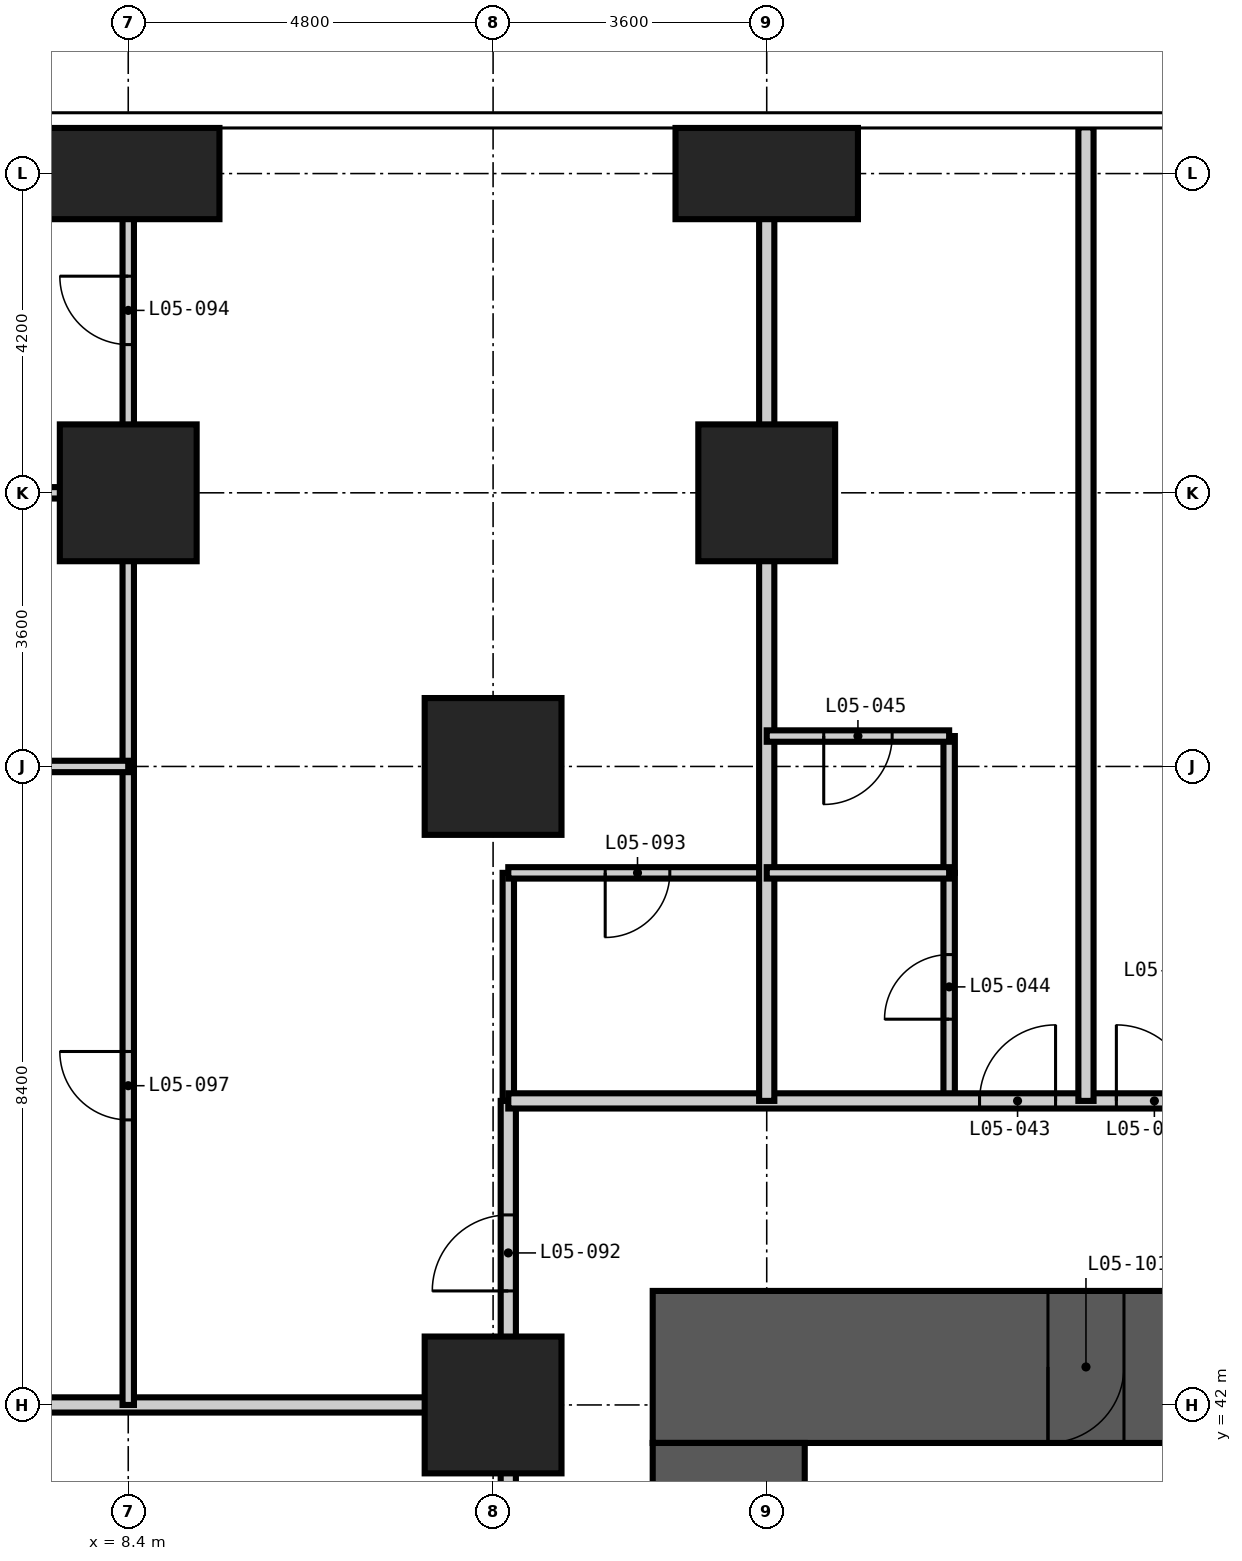
"""IFC4 building model, lengths in metres.
Left out: names, types, materials, properties, quantities, classifications, styles, units other than length and angle.
Written with IfcOpenShell. Run it as: python <this file> out.ifc"""

import sys

from ifc_helpers import new_model, si_unit, direction, frame, frame_2d, origin, origin_2d, place, context, subcontext, project, spatial, rectangle, extrude, element, fill, save


model = new_model("IFC4")
c1 = context("Model", 3, precision=1e-05, world=origin(), true_north=direction((0.0, 1.0)))
c2 = subcontext(c1, "Body", "Model", "MODEL_VIEW")
j1 = project(units=[si_unit("LENGTHUNIT", "METRE"), si_unit("PLANEANGLEUNIT", "RADIAN")], contexts=[c1])
p1 = place(None, origin())
s1 = spatial("IfcSite", under=j1, at=p1, CompositionType="ELEMENT")
p2 = place(p1, origin())
s2 = spatial("IfcBuilding", under=s1, at=p2, CompositionType="ELEMENT")
p3 = place(p2, frame((0.0, 0.0, 27.0)))
s3 = spatial("IfcBuildingStorey", under=s2, at=p3, CompositionType="ELEMENT", Elevation=27.0)
p4 = place(p3, frame((8.4, 54.0, -0.35), z_axis=(0.0, 0.0, 1.0), x_axis=(1.0, 0.0, 0.0)))
e1 = element("IfcColumn", 1, at=p4, inside=s3, PredefinedType="COLUMN", context=c2, shape_type="SweptSolid", body=[
    extrude(rectangle(XDim=1.8, YDim=1.8, at=origin_2d()), origin(), (0.0, 0.0, 1.0), 3.6),
])
p5 = place(p3, frame((8.4, 58.2, -0.35), z_axis=(0.0, 0.0, 1.0), x_axis=(1.0, 0.0, 0.0)))
e2 = element("IfcColumn", 2, at=p5, inside=s3, PredefinedType="COLUMN", context=c2, shape_type="SweptSolid", body=[
    extrude(rectangle(XDim=2.4, YDim=1.2, at=origin_2d()), origin(), (0.0, 0.0, 1.0), 3.6),
])
for number, where, z_axis, x_axis in (
    (3, (13.2, 42.0, -0.35), (0.0, 0.0, 1.0), (1.0, 0.0, 0.0)),
    (4, (13.2, 50.4, -0.35), (0.0, 0.0, 1.0), (1.0, 0.0, 0.0)),
    (5, (16.8, 54.0, -0.35), (0.0, 0.0, 1.0), (1.0, 0.0, 0.0)),
):
    element("IfcColumn", number, at=place(p3, frame(where, z_axis=z_axis, x_axis=x_axis)), inside=s3, PredefinedType="COLUMN", context=c2, shape_type="SweptSolid", body=[
        extrude(rectangle(XDim=1.8, YDim=1.8, at=origin_2d()), origin(), (0.0, 0.0, 1.0), 3.6),
    ])
p6 = place(p3, frame((16.8, 58.2, -0.35), z_axis=(0.0, 0.0, 1.0), x_axis=(1.0, 0.0, 0.0)))
e6 = element("IfcColumn", 6, at=p6, inside=s3, PredefinedType="COLUMN", context=c2, shape_type="SweptSolid", body=[
    extrude(rectangle(XDim=2.4, YDim=1.2, at=origin_2d()), origin(), (0.0, 0.0, 1.0), 3.6),
])
p7 = place(p3, frame((43.5, 42.5, -0.35), z_axis=(0.0, 0.0, 1.0), x_axis=(-1.0, 0.0, 0.0)))
e7 = element("IfcWall", 7, at=p7, inside=s3, PredefinedType="SHEAR", context=c2, shape_type="SweptSolid", body=[
    extrude(rectangle(XDim=28.2, YDim=2.0, at=frame_2d((14.1, 0.0))), origin(), (0.0, 0.0, 1.0), 3.6),
])
p8 = place(p7, frame((22.0, 0.0, 0.35)))
e8 = element("IfcOpeningElement", 8, at=p8, cuts=e7, PredefinedType="OPENING", context=c2, shape_type="SweptSolid", body=[
    extrude(rectangle(XDim=1.0, YDim=2.1, at=frame_2d((0.5, 1.05))), frame((0.0, 1.01, 0.0), z_axis=(0.0, -1.0, 0.0), x_axis=(1.0, 0.0, 0.0)), (0.0, 0.0, 1.0), 2.02),
])
p9 = place(p7, frame((11.4, 0.0, 0.35)))
e9 = element("IfcOpeningElement", 9, at=p9, cuts=e7, PredefinedType="OPENING", context=c2, shape_type="SweptSolid", body=[
    extrude(rectangle(XDim=1.2, YDim=2.2, at=frame_2d((0.6, 1.1))), frame((0.0, 1.01, 0.0), z_axis=(0.0, -1.0, 0.0), x_axis=(1.0, 0.0, 0.0)), (0.0, 0.0, 1.0), 2.02),
])
p10 = place(p3, frame((16.3, 41.5, -0.35), z_axis=(0.0, 0.0, 1.0), x_axis=(0.0, -1.0, 0.0)))
e10 = element("IfcWall", 10, at=p10, inside=s3, PredefinedType="SHEAR", context=c2, shape_type="SweptSolid", body=[
    extrude(rectangle(XDim=24.2, YDim=2.0, at=frame_2d((12.1, 0.0))), origin(), (0.0, 0.0, 1.0), 3.6),
])
p11 = place(p10, frame((11.2, 0.0, 0.35)))
e11 = element("IfcOpeningElement", 11, at=p11, cuts=e10, PredefinedType="OPENING", context=c2, shape_type="SweptSolid", body=[
    extrude(rectangle(XDim=1.8, YDim=2.2, at=frame_2d((0.9, 1.1))), frame((0.0, 1.01, 0.0), z_axis=(0.0, -1.0, 0.0), x_axis=(1.0, 0.0, 0.0)), (0.0, 0.0, 1.0), 2.02),
])
p12 = place(p10, frame((20.0, 0.0, 0.35)))
e12 = element("IfcOpeningElement", 12, at=p12, cuts=e10, PredefinedType="OPENING", context=c2, shape_type="SweptSolid", body=[
    extrude(rectangle(XDim=1.0, YDim=2.1, at=frame_2d((0.5, 1.05))), frame((0.0, 1.01, 0.0), z_axis=(0.0, -1.0, 0.0), x_axis=(1.0, 0.0, 0.0)), (0.0, 0.0, 1.0), 2.02),
])
p13 = place(p10, frame((5.3, 0.0, 0.35)))
e13 = element("IfcOpeningElement", 13, at=p13, cuts=e10, PredefinedType="OPENING", context=c2, shape_type="SweptSolid", body=[
    extrude(rectangle(XDim=1.0, YDim=2.1, at=frame_2d((0.5, 1.05))), frame((0.0, 1.01, 0.0), z_axis=(0.0, -1.0, 0.0), x_axis=(1.0, 0.0, 0.0)), (0.0, 0.0, 1.0), 2.02),
])
p14 = place(p3, frame((13.4, 46.0, 0.0), z_axis=(0.0, 0.0, 1.0), x_axis=(0.0, 1.0, 0.0)))
e14 = element("IfcWall", 14, at=p14, inside=s3, PredefinedType="PARTITIONING", context=c2, shape_type="SweptSolid", body=[
    extrude(rectangle(XDim=3.0, YDim=0.15, at=frame_2d((1.5, 0.0))), origin(), (0.0, 0.0, 1.0), 3.25),
])
p15 = place(p3, frame((19.2, 46.0, 0.0), z_axis=(0.0, 0.0, 1.0), x_axis=(0.0, 1.0, 0.0)))
e15 = element("IfcWall", 15, at=p15, inside=s3, PredefinedType="PARTITIONING", context=c2, shape_type="SweptSolid", body=[
    extrude(rectangle(XDim=3.0, YDim=0.15, at=frame_2d((1.5, 0.0))), origin(), (0.0, 0.0, 1.0), 3.25),
])
p16 = place(p15, frame((1.075, 0.0, 0.0)))
e16 = element("IfcOpeningElement", 16, at=p16, cuts=e15, PredefinedType="OPENING", context=c2, shape_type="SweptSolid", body=[
    extrude(rectangle(XDim=0.85, YDim=2.1, at=frame_2d((0.425, 1.05))), frame((0.0, 0.085, 0.0), z_axis=(0.0, -1.0, 0.0), x_axis=(1.0, 0.0, 0.0)), (0.0, 0.0, 1.0), 0.17),
])
p17 = place(p3, frame((13.4, 49.0, 0.0), z_axis=(0.0, 0.0, 1.0), x_axis=(1.0, 0.0, 0.0)))
e17 = element("IfcWall", 17, at=p17, inside=s3, PredefinedType="PARTITIONING", context=c2, shape_type="SweptSolid", body=[
    extrude(rectangle(XDim=3.4, YDim=0.15, at=frame_2d((1.7, 0.0))), origin(), (0.0, 0.0, 1.0), 3.25),
])
p18 = place(p17, frame((1.275, 0.0, 0.0)))
e18 = element("IfcOpeningElement", 18, at=p18, cuts=e17, PredefinedType="OPENING", context=c2, shape_type="SweptSolid", body=[
    extrude(rectangle(XDim=0.85, YDim=2.1, at=frame_2d((0.425, 1.05))), frame((0.0, 0.085, 0.0), z_axis=(0.0, -1.0, 0.0), x_axis=(1.0, 0.0, 0.0)), (0.0, 0.0, 1.0), 0.17),
])
p19 = place(p3, frame((5.4, 54.0, 0.0), z_axis=(0.0, 0.0, 1.0), x_axis=(1.0, 0.0, 0.0)))
e19 = element("IfcWall", 19, at=p19, inside=s3, PredefinedType="PARTITIONING", context=c2, shape_type="SweptSolid", body=[
    extrude(rectangle(XDim=3.0, YDim=0.15, at=frame_2d((1.5, 0.0))), origin(), (0.0, 0.0, 1.0), 3.25),
])
p20 = place(p3, frame((13.4, 42.0, 0.0), z_axis=(0.0, 0.0, 1.0), x_axis=(0.0, 1.0, 0.0)))
e20 = element("IfcWall", 20, at=p20, inside=s3, PredefinedType="PARTITIONING", context=c2, shape_type="SweptSolid", body=[
    extrude(rectangle(XDim=4.0, YDim=0.2, at=frame_2d((2.0, 0.0))), origin(), (0.0, 0.0, 1.0), 3.25),
])
p21 = place(p20, frame((1.5, 0.0, 0.0)))
e21 = element("IfcOpeningElement", 21, at=p21, cuts=e20, PredefinedType="OPENING", context=c2, shape_type="SweptSolid", body=[
    extrude(rectangle(XDim=1.0, YDim=2.2, at=frame_2d((0.5, 1.1))), frame((0.0, 0.11, 0.0), z_axis=(0.0, -1.0, 0.0), x_axis=(1.0, 0.0, 0.0)), (0.0, 0.0, 1.0), 0.22),
])
p22 = place(p3, frame((13.4, 46.0, 0.0), z_axis=(0.0, 0.0, 1.0), x_axis=(1.0, 0.0, 0.0)))
e22 = element("IfcWall", 22, at=p22, inside=s3, PredefinedType="PARTITIONING", context=c2, shape_type="SweptSolid", body=[
    extrude(rectangle(XDim=32.3, YDim=0.2, at=frame_2d((16.15, 0.0))), origin(), (0.0, 0.0, 1.0), 3.25),
])
p23 = place(p22, frame((6.2, 0.0, 0.0)))
e23 = element("IfcOpeningElement", 23, at=p23, cuts=e22, PredefinedType="OPENING", context=c2, shape_type="SweptSolid", body=[
    extrude(rectangle(XDim=1.0, YDim=2.2, at=frame_2d((0.5, 1.1))), frame((0.0, 0.11, 0.0), z_axis=(0.0, -1.0, 0.0), x_axis=(1.0, 0.0, 0.0)), (0.0, 0.0, 1.0), 0.22),
])
p24 = place(p22, frame((8.0, 0.0, 0.0)))
e24 = element("IfcOpeningElement", 24, at=p24, cuts=e22, PredefinedType="OPENING", context=c2, shape_type="SweptSolid", body=[
    extrude(rectangle(XDim=1.0, YDim=2.2, at=frame_2d((0.5, 1.1))), frame((0.0, 0.11, 0.0), z_axis=(0.0, -1.0, 0.0), x_axis=(1.0, 0.0, 0.0)), (0.0, 0.0, 1.0), 0.22),
])
p25 = place(p22, frame((14.6, 0.0, 0.0)))
e25 = element("IfcOpeningElement", 25, at=p25, cuts=e22, PredefinedType="OPENING", context=c2, shape_type="SweptSolid", body=[
    extrude(rectangle(XDim=1.0, YDim=2.2, at=frame_2d((0.5, 1.1))), frame((0.0, 0.11, 0.0), z_axis=(0.0, -1.0, 0.0), x_axis=(1.0, 0.0, 0.0)), (0.0, 0.0, 1.0), 0.22),
])
p26 = place(p22, frame((16.4, 0.0, 0.0)))
e26 = element("IfcOpeningElement", 26, at=p26, cuts=e22, PredefinedType="OPENING", context=c2, shape_type="SweptSolid", body=[
    extrude(rectangle(XDim=1.0, YDim=2.2, at=frame_2d((0.5, 1.1))), frame((0.0, 0.11, 0.0), z_axis=(0.0, -1.0, 0.0), x_axis=(1.0, 0.0, 0.0)), (0.0, 0.0, 1.0), 0.22),
])
p27 = place(p22, frame((23.0, 0.0, 0.0)))
e27 = element("IfcOpeningElement", 27, at=p27, cuts=e22, PredefinedType="OPENING", context=c2, shape_type="SweptSolid", body=[
    extrude(rectangle(XDim=1.0, YDim=2.2, at=frame_2d((0.5, 1.1))), frame((0.0, 0.11, 0.0), z_axis=(0.0, -1.0, 0.0), x_axis=(1.0, 0.0, 0.0)), (0.0, 0.0, 1.0), 0.22),
])
p28 = place(p22, frame((24.8, 0.0, 0.0)))
e28 = element("IfcOpeningElement", 28, at=p28, cuts=e22, PredefinedType="OPENING", context=c2, shape_type="SweptSolid", body=[
    extrude(rectangle(XDim=1.0, YDim=2.2, at=frame_2d((0.5, 1.1))), frame((0.0, 0.11, 0.0), z_axis=(0.0, -1.0, 0.0), x_axis=(1.0, 0.0, 0.0)), (0.0, 0.0, 1.0), 0.22),
])
p29 = place(p3, frame((13.4, 42.0, 0.0), z_axis=(0.0, 0.0, 1.0), x_axis=(0.0, -1.0, 0.0)))
e29 = element("IfcWall", 29, at=p29, inside=s3, PredefinedType="PARTITIONING", context=c2, shape_type="SweptSolid", body=[
    extrude(rectangle(XDim=8.4, YDim=0.2, at=frame_2d((4.2, 0.0))), origin(), (0.0, 0.0, 1.0), 3.25),
])
p30 = place(p29, frame((3.3, 0.0, 0.0)))
e30 = element("IfcOpeningElement", 30, at=p30, cuts=e29, PredefinedType="OPENING", context=c2, shape_type="SweptSolid", body=[
    extrude(rectangle(XDim=1.8, YDim=2.4, at=frame_2d((0.9, 1.2))), frame((0.0, 0.11, 0.0), z_axis=(0.0, -1.0, 0.0), x_axis=(1.0, 0.0, 0.0)), (0.0, 0.0, 1.0), 0.22),
])
for number, where, z_axis, x_axis in (
    (31, (16.8, 46.0, 0.0), (0.0, 0.0, 1.0), (0.0, 1.0, 0.0)),
    (32, (21.0, 46.0, 0.0), (0.0, 0.0, 1.0), (0.0, 1.0, 0.0)),
):
    element("IfcWall", number, at=place(p3, frame(where, z_axis=z_axis, x_axis=x_axis)), inside=s3, PredefinedType="PARTITIONING", context=c2, shape_type="SweptSolid", body=[
        extrude(rectangle(XDim=12.808, YDim=0.2, at=frame_2d((6.404, 0.0))), origin(), (0.0, 0.0, 1.0), 3.25),
    ])
p31 = place(p3, frame((-0.008, 42.0, 0.0), z_axis=(0.0, 0.0, 1.0), x_axis=(1.0, 0.0, 0.0)))
e33 = element("IfcWall", 33, at=p31, inside=s3, PredefinedType="PARTITIONING", context=c2, shape_type="SweptSolid", body=[
    extrude(rectangle(XDim=13.408, YDim=0.2, at=frame_2d((6.704, 0.0))), origin(), (0.0, 0.0, 1.0), 3.25),
])
p32 = place(p3, frame((8.4, 42.0, 0.0), z_axis=(0.0, 0.0, 1.0), x_axis=(0.0, 1.0, 0.0)))
e34 = element("IfcWall", 34, at=p32, inside=s3, PredefinedType="PARTITIONING", context=c2, shape_type="SweptSolid", body=[
    extrude(rectangle(XDim=16.808, YDim=0.15, at=frame_2d((8.404, 0.0))), origin(), (0.0, 0.0, 1.0), 3.25),
])
p33 = place(p32, frame((13.95, 0.0, 0.0)))
e35 = element("IfcOpeningElement", 35, at=p33, cuts=e34, PredefinedType="OPENING", context=c2, shape_type="SweptSolid", body=[
    extrude(rectangle(XDim=0.9, YDim=2.1, at=frame_2d((0.45, 1.05))), frame((0.0, 0.085, 0.0), z_axis=(0.0, -1.0, 0.0), x_axis=(1.0, 0.0, 0.0)), (0.0, 0.0, 1.0), 0.17),
])
p34 = place(p32, frame((3.75, 0.0, 0.0)))
e36 = element("IfcOpeningElement", 36, at=p34, cuts=e34, PredefinedType="OPENING", context=c2, shape_type="SweptSolid", body=[
    extrude(rectangle(XDim=0.9, YDim=2.1, at=frame_2d((0.45, 1.05))), frame((0.0, 0.085, 0.0), z_axis=(0.0, -1.0, 0.0), x_axis=(1.0, 0.0, 0.0)), (0.0, 0.0, 1.0), 0.17),
])
p35 = place(p3, frame((19.2, 49.0, 0.0), z_axis=(0.0, 0.0, 1.0), x_axis=(0.0, 1.0, 0.0)))
e37 = element("IfcWall", 37, at=p35, inside=s3, PredefinedType="PARTITIONING", context=c2, shape_type="SweptSolid", body=[
    extrude(rectangle(XDim=1.8, YDim=0.15, at=frame_2d((0.9, 0.0))), origin(), (0.0, 0.0, 1.0), 3.25),
])
p36 = place(p3, frame((16.8, 49.0, 0.0), z_axis=(0.0, 0.0, 1.0), x_axis=(1.0, 0.0, 0.0)))
e38 = element("IfcWall", 38, at=p36, inside=s3, PredefinedType="PARTITIONING", context=c2, shape_type="SweptSolid", body=[
    extrude(rectangle(XDim=2.4, YDim=0.15, at=frame_2d((1.2, 0.0))), origin(), (0.0, 0.0, 1.0), 3.25),
])
p37 = place(p3, frame((-0.008, 50.4, 0.0), z_axis=(0.0, 0.0, 1.0), x_axis=(1.0, 0.0, 0.0)))
e39 = element("IfcWall", 39, at=p37, inside=s3, PredefinedType="PARTITIONING", context=c2, shape_type="SweptSolid", body=[
    extrude(rectangle(XDim=8.408, YDim=0.15, at=frame_2d((4.204, 0.0))), origin(), (0.0, 0.0, 1.0), 3.25),
])
p38 = place(p37, frame((2.958, 0.0, 0.0)))
e40 = element("IfcOpeningElement", 40, at=p38, cuts=e39, PredefinedType="OPENING", context=c2, shape_type="SweptSolid", body=[
    extrude(rectangle(XDim=0.9, YDim=2.1, at=frame_2d((0.45, 1.05))), frame((0.0, 0.085, 0.0), z_axis=(0.0, -1.0, 0.0), x_axis=(1.0, 0.0, 0.0)), (0.0, 0.0, 1.0), 0.17),
])
p39 = place(p3, frame((16.8, 50.8, 0.0), z_axis=(0.0, 0.0, 1.0), x_axis=(1.0, 0.0, 0.0)))
e41 = element("IfcWall", 41, at=p39, inside=s3, PredefinedType="PARTITIONING", context=c2, shape_type="SweptSolid", body=[
    extrude(rectangle(XDim=2.4, YDim=0.15, at=frame_2d((1.2, 0.0))), origin(), (0.0, 0.0, 1.0), 3.25),
])
p40 = place(p39, frame((0.75, 0.0, 0.0)))
e42 = element("IfcOpeningElement", 42, at=p40, cuts=e41, PredefinedType="OPENING", context=c2, shape_type="SweptSolid", body=[
    extrude(rectangle(XDim=0.9, YDim=2.1, at=frame_2d((0.45, 1.05))), frame((0.0, 0.085, 0.0), z_axis=(0.0, -1.0, 0.0), x_axis=(1.0, 0.0, 0.0)), (0.0, 0.0, 1.0), 0.17),
])
p41 = place(p23, origin())
e43 = element("IfcDoor", 43, at=p41, inside=s3, OperationType="SINGLE_SWING_RIGHT", PredefinedType="DOOR", context=c2, shape_type="SweptSolid", body=[
    extrude(rectangle(XDim=1.0, YDim=2.2, at=frame_2d((0.5, 1.1))), frame((0.0, 0.025, 0.0), z_axis=(0.0, -1.0, 0.0), x_axis=(1.0, 0.0, 0.0)), (0.0, 0.0, 1.0), 0.05),
])
fill(e23, e43)
p42 = place(p16, origin())
e44 = element("IfcDoor", 44, at=p42, inside=s3, OperationType="SINGLE_SWING_LEFT", PredefinedType="DOOR", context=c2, shape_type="SweptSolid", body=[
    extrude(rectangle(XDim=0.85, YDim=2.1, at=frame_2d((0.425, 1.05))), frame((0.0, 0.025, 0.0), z_axis=(0.0, -1.0, 0.0), x_axis=(1.0, 0.0, 0.0)), (0.0, 0.0, 1.0), 0.05),
])
fill(e16, e44)
p43 = place(p40, frame((0.9, 0.0, 0.0), z_axis=(0.0, 0.0, 1.0), x_axis=(-1.0, 0.0, 0.0)))
e45 = element("IfcDoor", 45, at=p43, inside=s3, OperationType="SINGLE_SWING_RIGHT", PredefinedType="DOOR", context=c2, shape_type="SweptSolid", body=[
    extrude(rectangle(XDim=0.9, YDim=2.1, at=frame_2d((0.45, 1.05))), frame((0.0, 0.025, 0.0), z_axis=(0.0, -1.0, 0.0), x_axis=(1.0, 0.0, 0.0)), (0.0, 0.0, 1.0), 0.05),
])
fill(e42, e45)
p44 = place(p24, origin())
e46 = element("IfcDoor", 46, at=p44, inside=s3, OperationType="SINGLE_SWING_LEFT", PredefinedType="DOOR", context=c2, shape_type="SweptSolid", body=[
    extrude(rectangle(XDim=1.0, YDim=2.2, at=frame_2d((0.5, 1.1))), frame((0.0, 0.025, 0.0), z_axis=(0.0, -1.0, 0.0), x_axis=(1.0, 0.0, 0.0)), (0.0, 0.0, 1.0), 0.05),
])
fill(e24, e46)
p45 = place(p21, origin())
e47 = element("IfcDoor", 47, at=p45, inside=s3, OperationType="SINGLE_SWING_LEFT", PredefinedType="DOOR", context=c2, shape_type="SweptSolid", body=[
    extrude(rectangle(XDim=1.0, YDim=2.2, at=frame_2d((0.5, 1.1))), frame((0.0, 0.025, 0.0), z_axis=(0.0, -1.0, 0.0), x_axis=(1.0, 0.0, 0.0)), (0.0, 0.0, 1.0), 0.05),
])
fill(e21, e47)
p46 = place(p18, frame((0.85, 0.0, 0.0), z_axis=(0.0, 0.0, 1.0), x_axis=(-1.0, 0.0, 0.0)))
e48 = element("IfcDoor", 48, at=p46, inside=s3, OperationType="SINGLE_SWING_RIGHT", PredefinedType="DOOR", context=c2, shape_type="SweptSolid", body=[
    extrude(rectangle(XDim=0.85, YDim=2.1, at=frame_2d((0.425, 1.05))), frame((0.0, 0.025, 0.0), z_axis=(0.0, -1.0, 0.0), x_axis=(1.0, 0.0, 0.0)), (0.0, 0.0, 1.0), 0.05),
])
fill(e18, e48)
p47 = place(p33, origin())
e49 = element("IfcDoor", 49, at=p47, inside=s3, OperationType="SINGLE_SWING_RIGHT", PredefinedType="DOOR", context=c2, shape_type="SweptSolid", body=[
    extrude(rectangle(XDim=0.9, YDim=2.1, at=frame_2d((0.45, 1.05))), frame((0.0, 0.025, 0.0), z_axis=(0.0, -1.0, 0.0), x_axis=(1.0, 0.0, 0.0)), (0.0, 0.0, 1.0), 0.05),
])
fill(e35, e49)
p48 = place(p34, origin())
e50 = element("IfcDoor", 50, at=p48, inside=s3, OperationType="SINGLE_SWING_RIGHT", PredefinedType="DOOR", context=c2, shape_type="SweptSolid", body=[
    extrude(rectangle(XDim=0.9, YDim=2.1, at=frame_2d((0.45, 1.05))), frame((0.0, 0.025, 0.0), z_axis=(0.0, -1.0, 0.0), x_axis=(1.0, 0.0, 0.0)), (0.0, 0.0, 1.0), 0.05),
])
fill(e36, e50)
p49 = place(p8, origin())
e51 = element("IfcDoor", 51, at=p49, inside=s3, OperationType="SINGLE_SWING_RIGHT", PredefinedType="DOOR", context=c2, shape_type="SweptSolid", body=[
    extrude(rectangle(XDim=1.0, YDim=2.1, at=frame_2d((0.5, 1.05))), frame((0.0, 0.025, 0.0), z_axis=(0.0, -1.0, 0.0), x_axis=(1.0, 0.0, 0.0)), (0.0, 0.0, 1.0), 0.05),
])
fill(e8, e51)
save(model, sys.argv[1])
